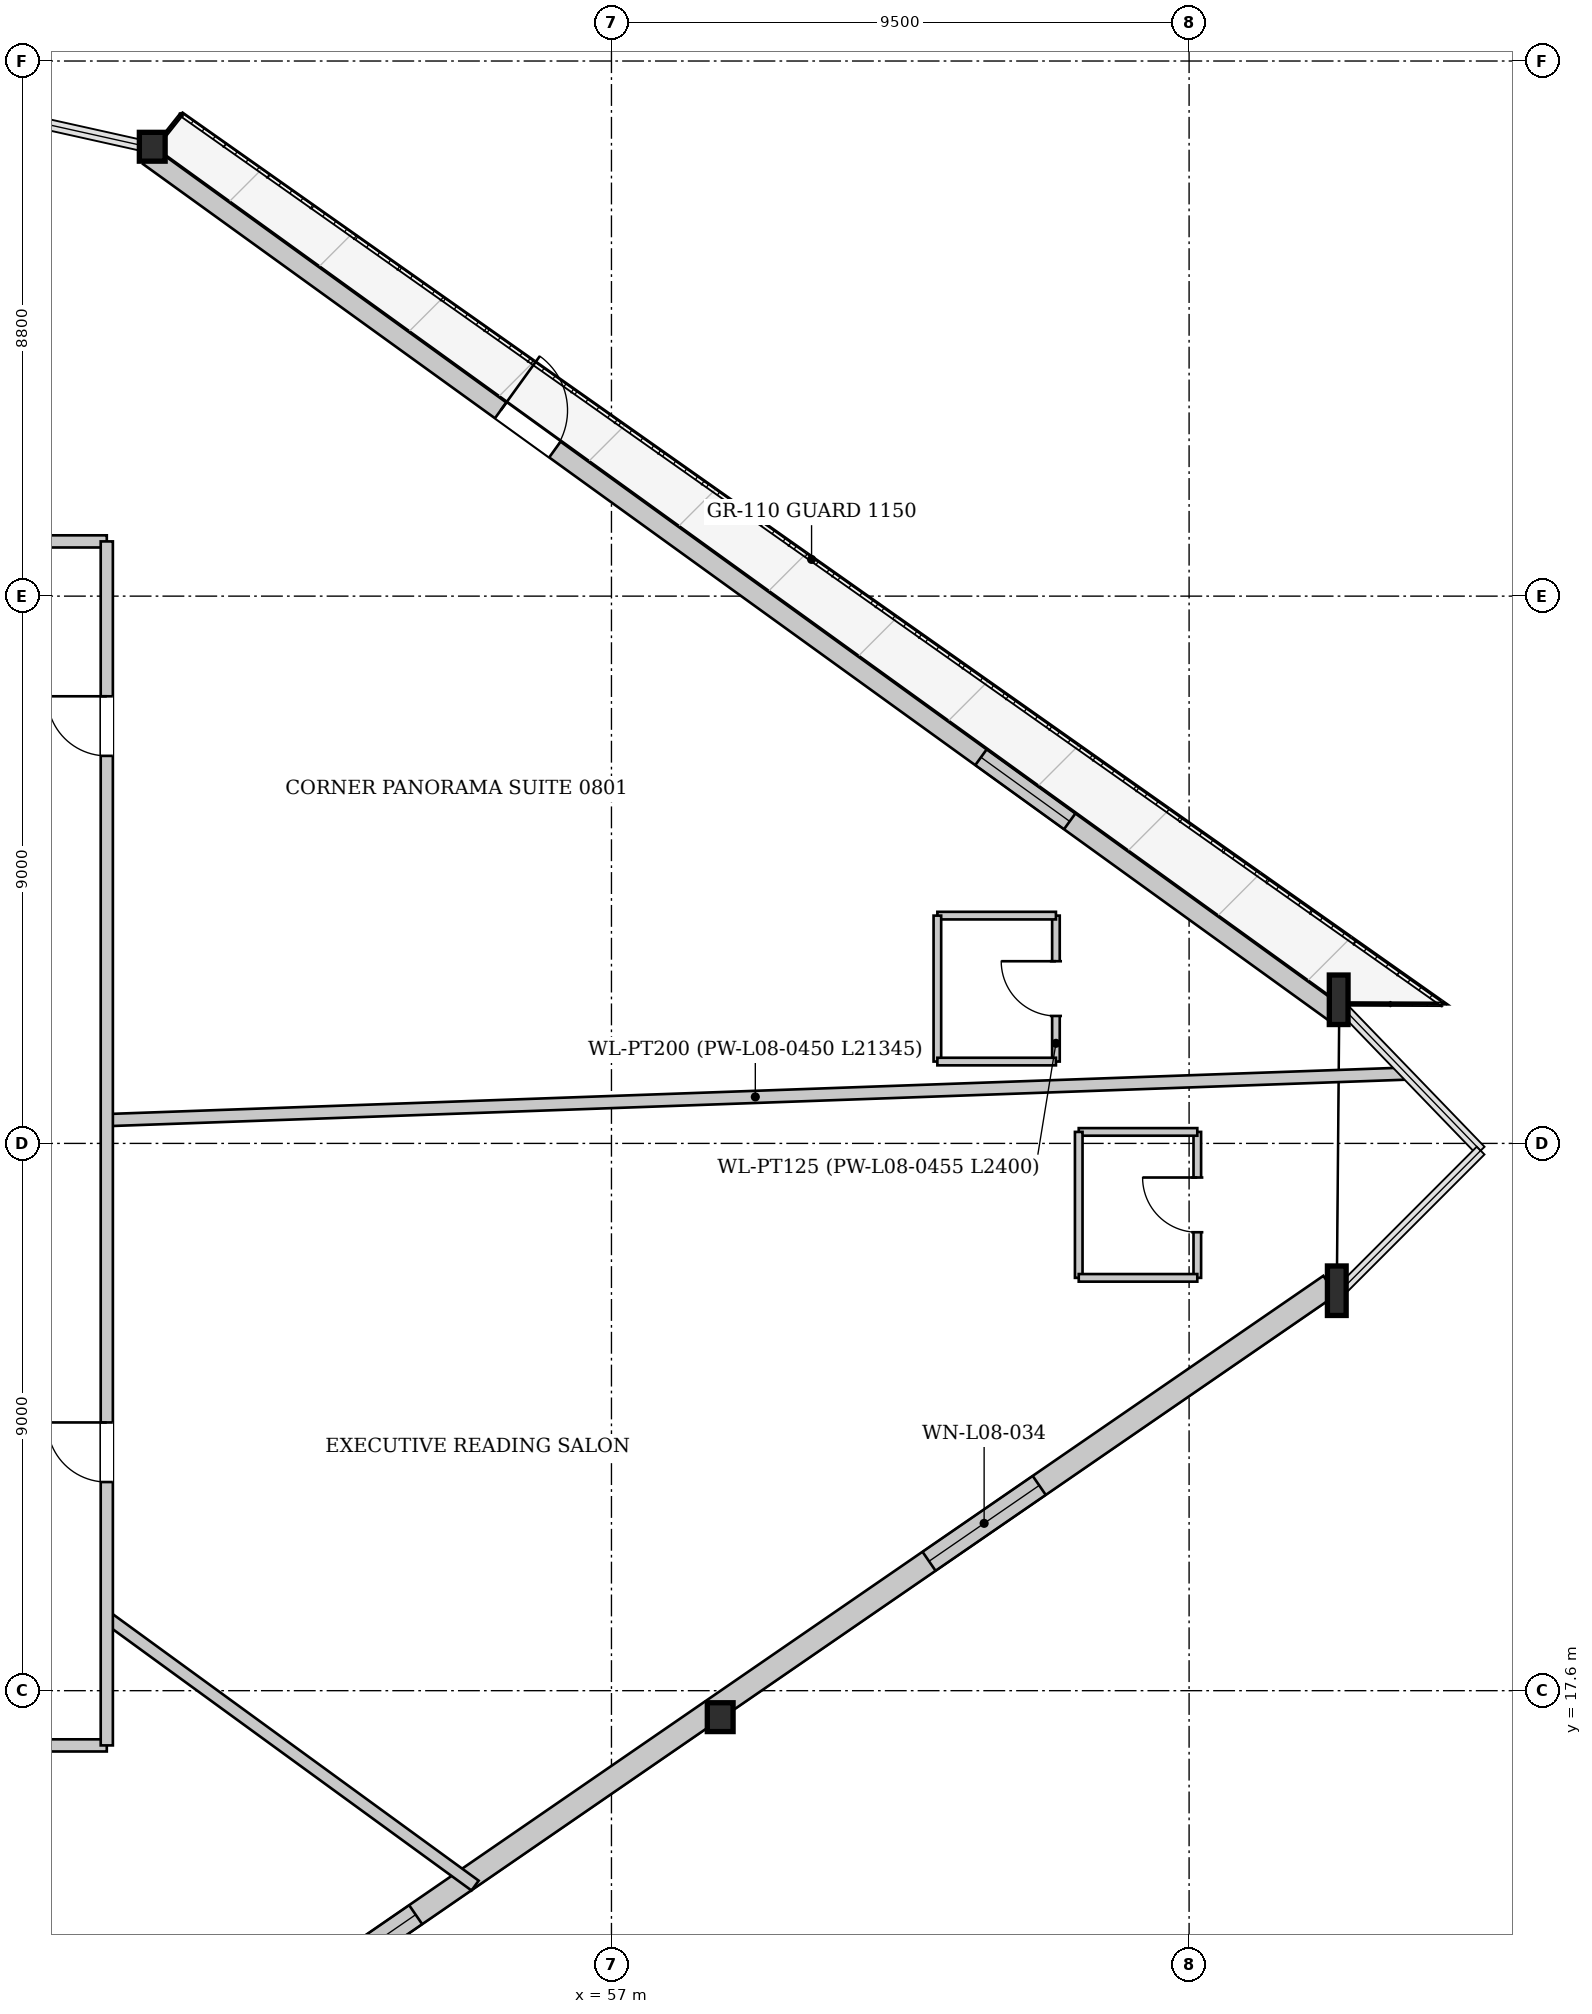
"""IFC4 building model, lengths in metres.
Left out: names, types, materials, properties, quantities, classifications, styles, units other than length and angle.
Written with IfcOpenShell. Run it as: python <this file> out.ifc"""

import sys

from ifc_helpers import new_model, si_unit, direction, frame, frame_2d, origin, origin_2d, place, context, subcontext, project, spatial, rectangle, i_section, extrude, source, transform, mapped, element, fill, save


model = new_model("IFC4")
c1 = context("Model", 3, precision=1e-05, world=origin(), true_north=direction((0.0, 1.0)))
c2 = subcontext(c1, "Body", "Model", "MODEL_VIEW")
j1 = project(units=[si_unit("LENGTHUNIT", "METRE"), si_unit("PLANEANGLEUNIT", "RADIAN")], contexts=[c1])
p1 = place(None, origin())
s1 = spatial("IfcSite", under=j1, at=p1, CompositionType="ELEMENT")
p2 = place(p1, origin())
s2 = spatial("IfcBuilding", under=s1, at=p2, CompositionType="ELEMENT")
p3 = place(p2, frame((0.0, 0.0, 36.4)))
s3 = spatial("IfcBuildingStorey", under=s2, at=p3, CompositionType="ELEMENT", Elevation=36.4)
m1 = source(origin(), c2, "Body", "SweptSolid", [
    extrude(i_section(OverallWidth=0.308, OverallDepth=0.814, WebThickness=0.021, FlangeThickness=0.04, at=origin_2d()), origin(), (0.0, 0.0, 1.0), 3.388),
])
for number, where, z_axis, x_axis in (
    (1, (68.924, 24.11, 0.0), (0.003, 0.04, 0.999), (-0.997, 0.079, 0.0)),
    (2, (68.965, 28.894, 0.0), (-0.003, 0.04, 0.999), (-0.997, -0.076, 0.0)),
):
    element("IfcColumn", number, at=place(p3, frame(where, z_axis=z_axis, x_axis=x_axis)), inside=s3, PredefinedType="COLUMN", context=c2, shape_type="MappedRepresentation", body=[
        mapped(m1, transform((0.0, 0.0, 0.0), x_axis=(1.0, 0.0, 0.0), y_axis=(0.0, 1.0, 0.0), z_axis=(0.0, 0.0, 1.0), scale=1.0)),
    ])
m2 = source(origin(), c2, "Body", "SweptSolid", [
    extrude(i_section(OverallWidth=0.424, OverallDepth=0.474, WebThickness=0.043, FlangeThickness=0.068, at=origin_2d()), origin(), (0.0, 0.0, 1.0), 3.386),
])
p4 = place(p3, frame((49.483, 42.965, 0.0), z_axis=(-0.021125322681, 0.014780515869, 0.999667573292), x_axis=(-0.573274647321, -0.819363276416, 0.0)))
e3 = element("IfcColumn", 3, at=p4, inside=s3, PredefinedType="COLUMN", context=c2, shape_type="MappedRepresentation", body=[
    mapped(m2, transform((0.0, 0.0, 0.0), x_axis=(1.0, 0.0, 0.0), y_axis=(0.0, 1.0, 0.0), z_axis=(0.0, 0.0, 1.0), scale=1.0)),
])
m3 = source(origin(), c2, "Body", "SweptSolid", [
    extrude(i_section(OverallWidth=0.424, OverallDepth=0.474, WebThickness=0.043, FlangeThickness=0.068, at=origin_2d()), origin(), (0.0, 0.0, 1.0), 3.386),
])
p5 = place(p3, frame((58.768, 17.119, 0.0), z_axis=(0.012183699372, 0.026746464301, 0.999567998746), x_axis=(-0.910030162055, 0.414542041475, 0.0)))
e4 = element("IfcColumn", 4, at=p5, inside=s3, PredefinedType="COLUMN", context=c2, shape_type="MappedRepresentation", body=[
    mapped(m3, transform((0.0, 0.0, 0.0), x_axis=(1.0, 0.0, 0.0), y_axis=(0.0, 1.0, 0.0), z_axis=(0.0, 0.0, 1.0), scale=1.0)),
])
p6 = place(p3, frame((49.39, 42.835, 0.0), z_axis=(0.0, 0.0, 1.0), x_axis=(0.810669048656, -0.585504648616, 0.0)))
e5 = element("IfcWall", 5, at=p6, inside=s3, PredefinedType="SOLIDWALL", context=c2, shape_type="SweptSolid", body=[
    extrude(rectangle(XDim=24.032, YDim=0.32, at=frame_2d((12.016, 0.0))), origin(), (0.0, 0.0, 1.0), 2.592),
])
p7 = place(p6, frame((7.14, 0.0, 0.0)))
e6 = element("IfcOpeningElement", 6, at=p7, cuts=e5, PredefinedType="OPENING", context=c2, shape_type="SweptSolid", body=[
    extrude(rectangle(XDim=1.1, YDim=2.3, at=frame_2d((0.55, 1.15))), frame((0.0, 0.17, 0.0), z_axis=(0.0, -1.0, 0.0), x_axis=(1.0, 0.0, 0.0)), (0.0, 0.0, 1.0), 0.34),
])
p8 = place(p6, frame((16.884, 0.0, 0.272)))
e7 = element("IfcOpeningElement", 7, at=p8, cuts=e5, PredefinedType="OPENING", context=c2, shape_type="SweptSolid", body=[
    extrude(rectangle(XDim=1.8, YDim=2.2, at=frame_2d((0.9, 1.1))), frame((0.0, 0.17, 0.0), z_axis=(0.0, -1.0, 0.0), x_axis=(1.0, 0.0, 0.0)), (0.0, 0.0, 1.0), 0.34),
])
p9 = place(p3, frame((68.816, 24.266, 0.0), z_axis=(0.0, 0.0, 1.0), x_axis=(-0.823714768531, -0.567004391608, 0.0)))
e8 = element("IfcWall", 8, at=p9, inside=s3, PredefinedType="SOLIDWALL", context=c2, shape_type="SweptSolid", body=[
    extrude(rectangle(XDim=24.658, YDim=0.38, at=frame_2d((12.329, 0.0))), origin(), (0.0, 0.0, 1.0), 2.592),
])
p10 = place(p9, frame((5.804, 0.0, 0.222)))
e9 = element("IfcOpeningElement", 9, at=p10, cuts=e8, PredefinedType="OPENING", context=c2, shape_type="SweptSolid", body=[
    extrude(rectangle(XDim=2.2, YDim=2.25, at=frame_2d((1.1, 1.125))), frame((0.0, 0.2, 0.0), z_axis=(0.0, -1.0, 0.0), x_axis=(1.0, 0.0, 0.0)), (0.0, 0.0, 1.0), 0.4),
])
p11 = place(p9, frame((18.254, 0.0, 0.222)))
e10 = element("IfcOpeningElement", 10, at=p11, cuts=e8, PredefinedType="OPENING", context=c2, shape_type="SweptSolid", body=[
    extrude(rectangle(XDim=2.2, YDim=2.25, at=frame_2d((1.1, 1.125))), frame((0.0, 0.2, 0.0), z_axis=(0.0, -1.0, 0.0), x_axis=(1.0, 0.0, 0.0)), (0.0, 0.0, 1.0), 0.4),
])
p12 = place(p3, frame((48.7, 26.983, 0.0), z_axis=(0.0, 0.0, 1.0), x_axis=(0.999359805542, 0.035776795099, 0.0)))
e11 = element("IfcWall", 11, at=p12, inside=s3, PredefinedType="PARTITIONING", context=c2, shape_type="SweptSolid", body=[
    extrude(rectangle(XDim=21.345, YDim=0.2, at=frame_2d((10.673, 0.0))), origin(), (0.0, 0.0, 1.0), 3.3),
])
p13 = place(p3, frame((48.7, 18.807, 0.0), z_axis=(0.0, 0.0, 1.0), x_axis=(0.808338601766, -0.58871784829, 0.0)))
e12 = element("IfcWall", 12, at=p13, inside=s3, PredefinedType="PARTITIONING", context=c2, shape_type="SweptSolid", body=[
    extrude(rectangle(XDim=7.494, YDim=0.2, at=frame_2d((3.747, 0.0))), origin(), (0.0, 0.0, 1.0), 3.3),
])
p14 = place(p3, frame((64.31, 27.946, 0.0), z_axis=(0.0, 0.0, 1.0), x_axis=(0.0, 1.0, 0.0)))
e13 = element("IfcWall", 13, at=p14, inside=s3, PredefinedType="PARTITIONING", context=c2, shape_type="SweptSolid", body=[
    extrude(rectangle(XDim=2.4, YDim=0.125, at=frame_2d((1.2, 0.0))), origin(), (0.0, 0.0, 1.0), 3.3),
])
p15 = place(p14, frame((0.75, 0.0, 0.0)))
e14 = element("IfcOpeningElement", 14, at=p15, cuts=e13, PredefinedType="OPENING", context=c2, shape_type="SweptSolid", body=[
    extrude(rectangle(XDim=0.9, YDim=2.1, at=frame_2d((0.45, 1.05))), frame((0.0, 0.073, 0.0), z_axis=(0.0, -1.0, 0.0), x_axis=(1.0, 0.0, 0.0)), (0.0, 0.0, 1.0), 0.145),
])
p16 = place(p3, frame((64.31, 30.346, 0.0), z_axis=(0.0, 0.0, 1.0), x_axis=(-1.0, 0.0, 0.0)))
e15 = element("IfcWall", 15, at=p16, inside=s3, PredefinedType="PARTITIONING", context=c2, shape_type="SweptSolid", body=[
    extrude(rectangle(XDim=1.95, YDim=0.125, at=frame_2d((0.975, 0.0))), origin(), (0.0, 0.0, 1.0), 3.3),
])
p17 = place(p3, frame((62.36, 30.346, 0.0), z_axis=(0.0, 0.0, 1.0), x_axis=(0.0, -1.0, 0.0)))
e16 = element("IfcWall", 16, at=p17, inside=s3, PredefinedType="PARTITIONING", context=c2, shape_type="SweptSolid", body=[
    extrude(rectangle(XDim=2.4, YDim=0.125, at=frame_2d((1.2, 0.0))), origin(), (0.0, 0.0, 1.0), 3.3),
])
p18 = place(p3, frame((62.36, 27.946, 0.0), z_axis=(0.0, 0.0, 1.0), x_axis=(1.0, 0.0, 0.0)))
e17 = element("IfcWall", 17, at=p18, inside=s3, PredefinedType="PARTITIONING", context=c2, shape_type="SweptSolid", body=[
    extrude(rectangle(XDim=1.95, YDim=0.125, at=frame_2d((0.975, 0.0))), origin(), (0.0, 0.0, 1.0), 3.3),
])
p19 = place(p3, frame((66.635, 24.389, 0.0), z_axis=(0.0, 0.0, 1.0), x_axis=(0.0, 1.0, 0.0)))
e18 = element("IfcWall", 18, at=p19, inside=s3, PredefinedType="PARTITIONING", context=c2, shape_type="SweptSolid", body=[
    extrude(rectangle(XDim=2.4, YDim=0.125, at=frame_2d((1.2, 0.0))), origin(), (0.0, 0.0, 1.0), 3.3),
])
p20 = place(p19, frame((0.75, 0.0, 0.0)))
e19 = element("IfcOpeningElement", 19, at=p20, cuts=e18, PredefinedType="OPENING", context=c2, shape_type="SweptSolid", body=[
    extrude(rectangle(XDim=0.9, YDim=2.1, at=frame_2d((0.45, 1.05))), frame((0.0, 0.073, 0.0), z_axis=(0.0, -1.0, 0.0), x_axis=(1.0, 0.0, 0.0)), (0.0, 0.0, 1.0), 0.145),
])
p21 = place(p3, frame((66.635, 26.789, 0.0), z_axis=(0.0, 0.0, 1.0), x_axis=(-1.0, 0.0, 0.0)))
e20 = element("IfcWall", 20, at=p21, inside=s3, PredefinedType="PARTITIONING", context=c2, shape_type="SweptSolid", body=[
    extrude(rectangle(XDim=1.95, YDim=0.125, at=frame_2d((0.975, 0.0))), origin(), (0.0, 0.0, 1.0), 2.795),
])
p22 = place(p3, frame((64.685, 26.789, 0.0), z_axis=(0.0, 0.0, 1.0), x_axis=(0.0, -1.0, 0.0)))
e21 = element("IfcWall", 21, at=p22, inside=s3, PredefinedType="PARTITIONING", context=c2, shape_type="SweptSolid", body=[
    extrude(rectangle(XDim=2.4, YDim=0.125, at=frame_2d((1.2, 0.0))), origin(), (0.0, 0.0, 1.0), 3.3),
])
p23 = place(p3, frame((64.685, 24.389, 0.0), z_axis=(0.0, 0.0, 1.0), x_axis=(1.0, 0.0, 0.0)))
e22 = element("IfcWall", 22, at=p23, inside=s3, PredefinedType="PARTITIONING", context=c2, shape_type="SweptSolid", body=[
    extrude(rectangle(XDim=1.95, YDim=0.125, at=frame_2d((0.975, 0.0))), origin(), (0.0, 0.0, 1.0), 3.3),
])
p24 = place(p3, frame((27.3, 16.7, 0.0), z_axis=(0.0, 0.0, 1.0), x_axis=(1.0, 0.0, 0.0)))
e23 = element("IfcWall", 23, at=p24, inside=s3, PredefinedType="PARTITIONING", context=c2, shape_type="SweptSolid", body=[
    extrude(rectangle(XDim=21.4, YDim=0.2, at=frame_2d((10.7, 0.0))), origin(), (0.0, 0.0, 1.0), 3.3),
])
p25 = place(p24, frame((9.21, 0.0, 0.0)))
e24 = element("IfcOpeningElement", 24, at=p25, cuts=e23, PredefinedType="OPENING", context=c2, shape_type="SweptSolid", body=[
    extrude(rectangle(XDim=0.98, YDim=2.15, at=frame_2d((0.49, 1.075))), frame((0.0, 0.11, 0.0), z_axis=(0.0, -1.0, 0.0), x_axis=(1.0, 0.0, 0.0)), (0.0, 0.0, 1.0), 0.22),
])
p26 = place(p3, frame((27.3, 36.5, 0.0), z_axis=(0.0, 0.0, 1.0), x_axis=(1.0, 0.0, 0.0)))
e25 = element("IfcWall", 25, at=p26, inside=s3, PredefinedType="PARTITIONING", context=c2, shape_type="SweptSolid", body=[
    extrude(rectangle(XDim=21.4, YDim=0.2, at=frame_2d((10.7, 0.0))), origin(), (0.0, 0.0, 1.0), 3.3),
])
p27 = place(p26, frame((4.484, 0.0, 0.0)))
e26 = element("IfcOpeningElement", 26, at=p27, cuts=e25, PredefinedType="OPENING", context=c2, shape_type="SweptSolid", body=[
    extrude(rectangle(XDim=0.98, YDim=2.15, at=frame_2d((0.49, 1.075))), frame((0.0, 0.11, 0.0), z_axis=(0.0, -1.0, 0.0), x_axis=(1.0, 0.0, 0.0)), (0.0, 0.0, 1.0), 0.22),
])
p28 = place(p3, frame((48.7, 16.7, 0.0), z_axis=(0.0, 0.0, 1.0), x_axis=(0.0, 1.0, 0.0)))
e27 = element("IfcWall", 27, at=p28, inside=s3, PredefinedType="PARTITIONING", context=c2, shape_type="SweptSolid", body=[
    extrude(rectangle(XDim=19.8, YDim=0.2, at=frame_2d((9.9, 0.0))), origin(), (0.0, 0.0, 1.0), 3.3),
])
p29 = place(p28, frame((16.273, 0.0, 0.0)))
e28 = element("IfcOpeningElement", 28, at=p29, cuts=e27, PredefinedType="OPENING", context=c2, shape_type="SweptSolid", body=[
    extrude(rectangle(XDim=0.98, YDim=2.15, at=frame_2d((0.49, 1.075))), frame((0.0, 0.11, 0.0), z_axis=(0.0, -1.0, 0.0), x_axis=(1.0, 0.0, 0.0)), (0.0, 0.0, 1.0), 0.22),
])
p30 = place(p28, frame((4.331, 0.0, 0.0)))
e29 = element("IfcOpeningElement", 29, at=p30, cuts=e27, PredefinedType="OPENING", context=c2, shape_type="SweptSolid", body=[
    extrude(rectangle(XDim=0.98, YDim=2.15, at=frame_2d((0.49, 1.075))), frame((0.0, 0.11, 0.0), z_axis=(0.0, -1.0, 0.0), x_axis=(1.0, 0.0, 0.0)), (0.0, 0.0, 1.0), 0.22),
])
m4 = source(origin(), c2, "Body", "SweptSolid", [
    extrude(rectangle(XDim=1.1, YDim=2.3, at=frame_2d((0.55, 1.15))), frame((0.0, 0.025, 0.0), z_axis=(0.0, -1.0, 0.0), x_axis=(1.0, 0.0, 0.0)), (0.0, 0.0, 1.0), 0.05),
])
p31 = place(p7, origin())
e30 = element("IfcDoor", 30, at=p31, inside=s3, OperationType="SINGLE_SWING_LEFT", PredefinedType="DOOR", context=c2, shape_type="MappedRepresentation", body=[
    mapped(m4, transform((0.0, 0.0, 0.0), x_axis=(1.0, 0.0, 0.0), y_axis=(0.0, 1.0, 0.0), z_axis=(0.0, 0.0, 1.0), scale=1.0)),
])
fill(e6, e30)
m5 = source(origin(), c2, "Body", "SweptSolid", [
    extrude(rectangle(XDim=1.8, YDim=2.2, at=frame_2d((0.9, 1.1))), frame((0.0, 0.03, 0.0), z_axis=(0.0, -1.0, 0.0), x_axis=(1.0, 0.0, 0.0)), (0.0, 0.0, 1.0), 0.06),
])
p32 = place(p8, origin())
e31 = element("IfcWindow", 31, at=p32, inside=s3, PartitioningType="SINGLE_PANEL", PredefinedType="WINDOW", context=c2, shape_type="MappedRepresentation", body=[
    mapped(m5, transform((0.0, 0.0, 0.0), x_axis=(1.0, 0.0, 0.0), y_axis=(0.0, 1.0, 0.0), z_axis=(0.0, 0.0, 1.0), scale=1.0)),
])
fill(e7, e31)
m6 = source(origin(), c2, "Body", "SweptSolid", [
    extrude(rectangle(XDim=2.2, YDim=2.25, at=frame_2d((1.1, 1.125))), frame((0.0, 0.03, 0.0), z_axis=(0.0, -1.0, 0.0), x_axis=(1.0, 0.0, 0.0)), (0.0, 0.0, 1.0), 0.06),
])
p33 = place(p10, origin())
e32 = element("IfcWindow", 32, at=p33, inside=s3, PartitioningType="SINGLE_PANEL", PredefinedType="WINDOW", context=c2, shape_type="MappedRepresentation", body=[
    mapped(m6, transform((0.0, 0.0, 0.0), x_axis=(1.0, 0.0, 0.0), y_axis=(0.0, 1.0, 0.0), z_axis=(0.0, 0.0, 1.0), scale=1.0)),
])
fill(e9, e32)
p34 = place(p11, origin())
e33 = element("IfcWindow", 33, at=p34, inside=s3, PartitioningType="SINGLE_PANEL", PredefinedType="WINDOW", context=c2, shape_type="MappedRepresentation", body=[
    mapped(m6, transform((0.0, 0.0, 0.0), x_axis=(1.0, 0.0, 0.0), y_axis=(0.0, 1.0, 0.0), z_axis=(0.0, 0.0, 1.0), scale=1.0)),
])
fill(e10, e33)
m7 = source(origin(), c2, "Body", "SweptSolid", [
    extrude(rectangle(XDim=0.9, YDim=2.1, at=frame_2d((0.45, 1.05))), frame((0.0, 0.025, 0.0), z_axis=(0.0, -1.0, 0.0), x_axis=(1.0, 0.0, 0.0)), (0.0, 0.0, 1.0), 0.05),
])
p35 = place(p15, origin())
e34 = element("IfcDoor", 34, at=p35, inside=s3, OperationType="SINGLE_SWING_RIGHT", PredefinedType="DOOR", context=c2, shape_type="MappedRepresentation", body=[
    mapped(m7, transform((0.0, 0.0, 0.0), x_axis=(1.0, 0.0, 0.0), y_axis=(0.0, 1.0, 0.0), z_axis=(0.0, 0.0, 1.0), scale=1.0)),
])
fill(e14, e34)
p36 = place(p20, origin())
e35 = element("IfcDoor", 35, at=p36, inside=s3, OperationType="SINGLE_SWING_RIGHT", PredefinedType="DOOR", context=c2, shape_type="MappedRepresentation", body=[
    mapped(m7, transform((0.0, 0.0, 0.0), x_axis=(1.0, 0.0, 0.0), y_axis=(0.0, 1.0, 0.0), z_axis=(0.0, 0.0, 1.0), scale=1.0)),
])
fill(e19, e35)
m8 = source(origin(), c2, "Body", "SweptSolid", [
    extrude(rectangle(XDim=0.98, YDim=2.15, at=frame_2d((0.49, 1.075))), frame((0.0, 0.025, 0.0), z_axis=(0.0, -1.0, 0.0), x_axis=(1.0, 0.0, 0.0)), (0.0, 0.0, 1.0), 0.05),
])
p37 = place(p29, origin())
e36 = element("IfcDoor", 36, at=p37, inside=s3, OperationType="SINGLE_SWING_RIGHT", PredefinedType="DOOR", context=c2, shape_type="MappedRepresentation", body=[
    mapped(m8, transform((0.0, 0.0, 0.0), x_axis=(1.0, 0.0, 0.0), y_axis=(0.0, 1.0, 0.0), z_axis=(0.0, 0.0, 1.0), scale=1.0)),
])
fill(e28, e36)
p38 = place(p30, origin())
e37 = element("IfcDoor", 37, at=p38, inside=s3, OperationType="SINGLE_SWING_RIGHT", PredefinedType="DOOR", context=c2, shape_type="MappedRepresentation", body=[
    mapped(m8, transform((0.0, 0.0, 0.0), x_axis=(1.0, 0.0, 0.0), y_axis=(0.0, 1.0, 0.0), z_axis=(0.0, 0.0, 1.0), scale=1.0)),
])
fill(e29, e37)
save(model, sys.argv[1])
